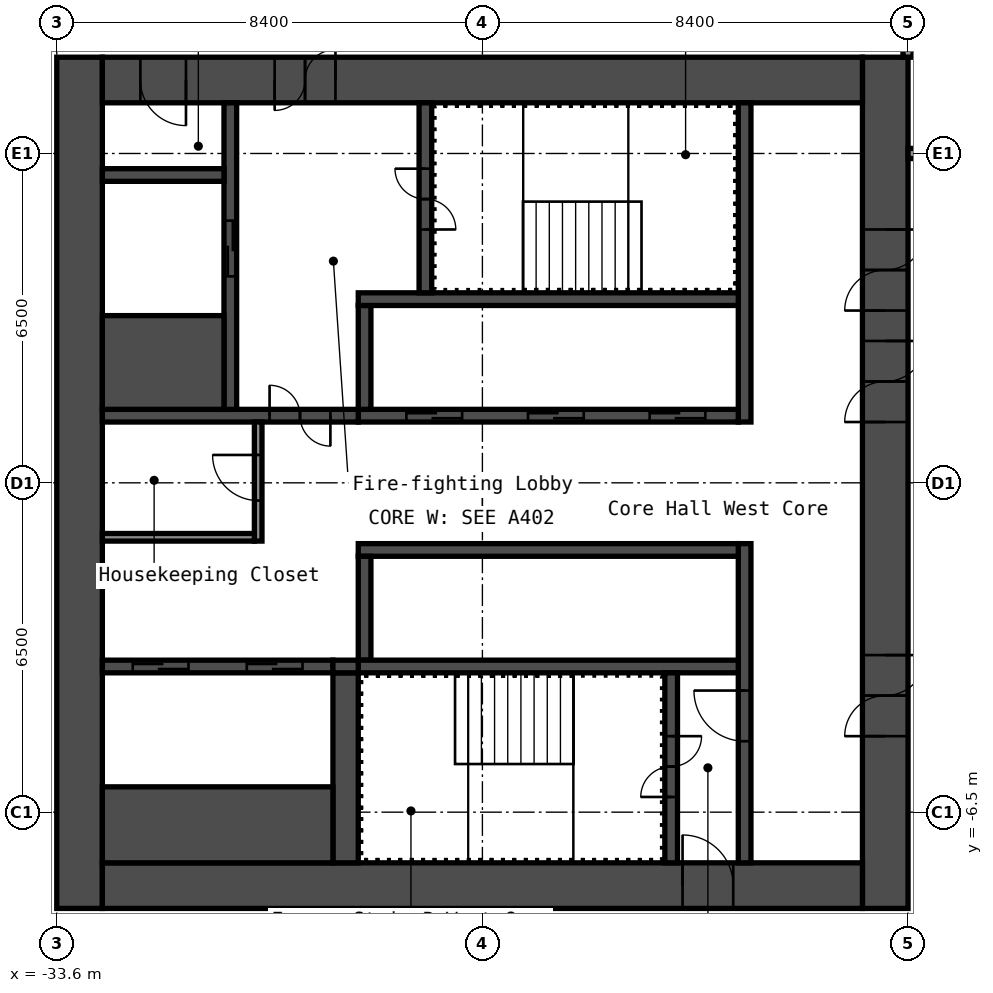
"""IFC4 building model, lengths in metres.
Left out: names, types, materials, properties, quantities, classifications, styles, units other than length and angle.
Written with IfcOpenShell. Run it as: python <this file> out.ifc"""

import sys

from ifc_helpers import new_model, si_unit, direction, frame, frame_2d, origin, place, context, subcontext, project, spatial, rectangle, extrude, element, fill, save


model = new_model("IFC4")
c1 = context("Model", 3, precision=1e-05, world=origin(), true_north=direction((0.0, 1.0)))
c2 = subcontext(c1, "Body", "Model", "MODEL_VIEW")
j1 = project(units=[si_unit("LENGTHUNIT", "METRE"), si_unit("PLANEANGLEUNIT", "RADIAN")], contexts=[c1])
p1 = place(None, origin())
s1 = spatial("IfcSite", under=j1, at=p1, CompositionType="ELEMENT")
p2 = place(p1, origin())
s2 = spatial("IfcBuilding", under=s1, at=p2, CompositionType="ELEMENT")
p3 = place(p2, frame((0.0, 0.0, 9.0)))
s3 = spatial("IfcBuildingStorey", under=s2, at=p3, CompositionType="ELEMENT", Elevation=9.0)
p4 = place(p3, frame((-17.25, -8.4, 0.0), z_axis=(0.0, 0.0, 1.0), x_axis=(0.0, 1.0, 0.0)))
e1 = element("IfcWall", 1, at=p4, inside=s3, PredefinedType="SHEAR", context=c2, shape_type="SweptSolid", body=[
    extrude(rectangle(XDim=16.8, YDim=0.9, at=frame_2d((8.4, 0.0))), origin(), (0.0, 0.0, 1.0), 5.6),
])
p5 = place(p4, frame((3.4, 0.0, 0.0)))
e2 = element("IfcOpeningElement", 2, at=p5, cuts=e1, PredefinedType="OPENING", context=c2, shape_type="SweptSolid", body=[
    extrude(rectangle(XDim=1.6, YDim=2.1, at=frame_2d((0.8, 1.05))), frame((0.0, 0.46, 0.0), z_axis=(0.0, -1.0, 0.0), x_axis=(1.0, 0.0, 0.0)), (0.0, 0.0, 1.0), 0.92),
])
p6 = place(p4, frame((9.6, 0.0, 0.0)))
e3 = element("IfcOpeningElement", 3, at=p6, cuts=e1, PredefinedType="OPENING", context=c2, shape_type="SweptSolid", body=[
    extrude(rectangle(XDim=1.6, YDim=2.1, at=frame_2d((0.8, 1.05))), frame((0.0, 0.46, 0.0), z_axis=(0.0, -1.0, 0.0), x_axis=(1.0, 0.0, 0.0)), (0.0, 0.0, 1.0), 0.92),
])
p7 = place(p4, frame((11.8, 0.0, 0.0)))
e4 = element("IfcOpeningElement", 4, at=p7, cuts=e1, PredefinedType="OPENING", context=c2, shape_type="SweptSolid", body=[
    extrude(rectangle(XDim=1.6, YDim=2.1, at=frame_2d((0.8, 1.05))), frame((0.0, 0.46, 0.0), z_axis=(0.0, -1.0, 0.0), x_axis=(1.0, 0.0, 0.0)), (0.0, 0.0, 1.0), 0.92),
])
p8 = place(p3, frame((-33.15, -8.4, 0.0), z_axis=(0.0, 0.0, 1.0), x_axis=(0.0, 1.0, 0.0)))
e5 = element("IfcWall", 5, at=p8, inside=s3, PredefinedType="SHEAR", context=c2, shape_type="SweptSolid", body=[
    extrude(rectangle(XDim=16.8, YDim=0.9, at=frame_2d((8.4, 0.0))), origin(), (0.0, 0.0, 1.0), 5.6),
])
p9 = place(p3, frame((-32.7, 7.95, 0.0), z_axis=(0.0, 0.0, 1.0), x_axis=(1.0, 0.0, 0.0)))
e6 = element("IfcWall", 6, at=p9, inside=s3, PredefinedType="SHEAR", context=c2, shape_type="SweptSolid", body=[
    extrude(rectangle(XDim=15.0, YDim=0.9, at=frame_2d((7.5, 0.0))), origin(), (0.0, 0.0, 1.0), 5.6),
])
p10 = place(p9, frame((3.4, 0.0, 0.0)))
e7 = element("IfcOpeningElement", 7, at=p10, cuts=e6, PredefinedType="OPENING", context=c2, shape_type="SweptSolid", body=[
    extrude(rectangle(XDim=1.2, YDim=2.1, at=frame_2d((0.6, 1.05))), frame((0.0, 0.46, 0.0), z_axis=(0.0, -1.0, 0.0), x_axis=(1.0, 0.0, 0.0)), (0.0, 0.0, 1.0), 0.92),
])
p11 = place(p9, frame((0.75, 0.0, 0.0)))
e8 = element("IfcOpeningElement", 8, at=p11, cuts=e6, PredefinedType="OPENING", context=c2, shape_type="SweptSolid", body=[
    extrude(rectangle(XDim=0.9, YDim=2.1, at=frame_2d((0.45, 1.05))), frame((0.0, 0.46, 0.0), z_axis=(0.0, -1.0, 0.0), x_axis=(1.0, 0.0, 0.0)), (0.0, 0.0, 1.0), 0.92),
])
p12 = place(p3, frame((-32.7, -7.95, 0.0), z_axis=(0.0, 0.0, 1.0), x_axis=(1.0, 0.0, 0.0)))
e9 = element("IfcWall", 9, at=p12, inside=s3, PredefinedType="SHEAR", context=c2, shape_type="SweptSolid", body=[
    extrude(rectangle(XDim=15.0, YDim=0.9, at=frame_2d((7.5, 0.0))), origin(), (0.0, 0.0, 1.0), 5.6),
])
p13 = place(p12, frame((11.45, 0.0, 0.0)))
e10 = element("IfcOpeningElement", 10, at=p13, cuts=e9, PredefinedType="OPENING", context=c2, shape_type="SweptSolid", body=[
    extrude(rectangle(XDim=1.0, YDim=2.1, at=frame_2d((0.5, 1.05))), frame((0.0, 0.46, 0.0), z_axis=(0.0, -1.0, 0.0), x_axis=(1.0, 0.0, 0.0)), (0.0, 0.0, 1.0), 0.92),
])
p14 = place(p3, frame((-20.025, 1.2, 0.0), z_axis=(0.0, 0.0, 1.0), x_axis=(0.0, 1.0, 0.0)))
e11 = element("IfcWall", 11, at=p14, inside=s3, PredefinedType="SHEAR", context=c2, shape_type="SweptSolid", body=[
    extrude(rectangle(XDim=6.3, YDim=0.25, at=frame_2d((3.15, 0.0))), origin(), (0.0, 0.0, 1.0), 5.6),
])
p15 = place(p3, frame((-20.025, -7.5, 0.0), z_axis=(0.0, 0.0, 1.0), x_axis=(0.0, 1.0, 0.0)))
e12 = element("IfcWall", 12, at=p15, inside=s3, PredefinedType="SHEAR", context=c2, shape_type="SweptSolid", body=[
    extrude(rectangle(XDim=6.3, YDim=0.25, at=frame_2d((3.15, 0.0))), origin(), (0.0, 0.0, 1.0), 5.6),
])
p16 = place(p15, frame((2.4, 0.0, 0.0)))
e13 = element("IfcOpeningElement", 13, at=p16, cuts=e12, PredefinedType="OPENING", context=c2, shape_type="SweptSolid", body=[
    extrude(rectangle(XDim=1.0, YDim=2.1, at=frame_2d((0.5, 1.05))), frame((0.0, 0.135, 0.0), z_axis=(0.0, -1.0, 0.0), x_axis=(1.0, 0.0, 0.0)), (0.0, 0.0, 1.0), 0.27),
])
p17 = place(p3, frame((-27.65, 1.325, 0.0), z_axis=(0.0, 0.0, 1.0), x_axis=(1.0, 0.0, 0.0)))
e14 = element("IfcWall", 14, at=p17, inside=s3, PredefinedType="SHEAR", context=c2, shape_type="SweptSolid", body=[
    extrude(rectangle(XDim=7.5, YDim=0.25, at=frame_2d((3.75, 0.0))), origin(), (0.0, 0.0, 1.0), 5.6),
])
p18 = place(p17, frame((5.75, 0.0, 0.0)))
e15 = element("IfcOpeningElement", 15, at=p18, cuts=e14, PredefinedType="OPENING", context=c2, shape_type="SweptSolid", body=[
    extrude(rectangle(XDim=1.1, YDim=2.1, at=frame_2d((0.55, 1.05))), frame((0.0, 0.135, 0.0), z_axis=(0.0, -1.0, 0.0), x_axis=(1.0, 0.0, 0.0)), (0.0, 0.0, 1.0), 0.27),
])
p19 = place(p17, frame((3.35, 0.0, 0.0)))
e16 = element("IfcOpeningElement", 16, at=p19, cuts=e14, PredefinedType="OPENING", context=c2, shape_type="SweptSolid", body=[
    extrude(rectangle(XDim=1.1, YDim=2.1, at=frame_2d((0.55, 1.05))), frame((0.0, 0.135, 0.0), z_axis=(0.0, -1.0, 0.0), x_axis=(1.0, 0.0, 0.0)), (0.0, 0.0, 1.0), 0.27),
])
p20 = place(p17, frame((0.95, 0.0, 0.0)))
e17 = element("IfcOpeningElement", 17, at=p20, cuts=e14, PredefinedType="OPENING", context=c2, shape_type="SweptSolid", body=[
    extrude(rectangle(XDim=1.1, YDim=2.1, at=frame_2d((0.55, 1.05))), frame((0.0, 0.135, 0.0), z_axis=(0.0, -1.0, 0.0), x_axis=(1.0, 0.0, 0.0)), (0.0, 0.0, 1.0), 0.27),
])
p21 = place(p3, frame((-27.525, 1.45, 0.0), z_axis=(0.0, 0.0, 1.0), x_axis=(0.0, 1.0, 0.0)))
e18 = element("IfcWall", 18, at=p21, inside=s3, PredefinedType="SHEAR", context=c2, shape_type="SweptSolid", body=[
    extrude(rectangle(XDim=2.05, YDim=0.25, at=frame_2d((1.025, 0.0))), origin(), (0.0, 0.0, 1.0), 5.6),
])
p22 = place(p3, frame((-27.65, 3.625, 0.0), z_axis=(0.0, 0.0, 1.0), x_axis=(1.0, 0.0, 0.0)))
e19 = element("IfcWall", 19, at=p22, inside=s3, PredefinedType="SHEAR", context=c2, shape_type="SweptSolid", body=[
    extrude(rectangle(XDim=7.5, YDim=0.25, at=frame_2d((3.75, 0.0))), origin(), (0.0, 0.0, 1.0), 5.6),
])
p23 = place(p3, frame((-26.325, 3.75, 0.0), z_axis=(0.0, 0.0, 1.0), x_axis=(0.0, 1.0, 0.0)))
e20 = element("IfcWall", 20, at=p23, inside=s3, PredefinedType="SHEAR", context=c2, shape_type="SweptSolid", body=[
    extrude(rectangle(XDim=3.75, YDim=0.25, at=frame_2d((1.875, 0.0))), origin(), (0.0, 0.0, 1.0), 5.6),
])
p24 = place(p23, frame((1.25, 0.0, 0.0)))
e21 = element("IfcOpeningElement", 21, at=p24, cuts=e20, PredefinedType="OPENING", context=c2, shape_type="SweptSolid", body=[
    extrude(rectangle(XDim=1.2, YDim=2.1, at=frame_2d((0.6, 1.05))), frame((0.0, 0.135, 0.0), z_axis=(0.0, -1.0, 0.0), x_axis=(1.0, 0.0, 0.0)), (0.0, 0.0, 1.0), 0.27),
])
p25 = place(p3, frame((-32.7, 1.325, 0.0), z_axis=(0.0, 0.0, 1.0), x_axis=(1.0, 0.0, 0.0)))
e22 = element("IfcWall", 22, at=p25, inside=s3, PredefinedType="SHEAR", context=c2, shape_type="SweptSolid", body=[
    extrude(rectangle(XDim=5.05, YDim=0.25, at=frame_2d((2.525, 0.0))), origin(), (0.0, 0.0, 1.0), 5.6),
])
p26 = place(p25, frame((3.3, 0.0, 0.0)))
e23 = element("IfcOpeningElement", 23, at=p26, cuts=e22, PredefinedType="OPENING", context=c2, shape_type="SweptSolid", body=[
    extrude(rectangle(XDim=1.2, YDim=2.1, at=frame_2d((0.6, 1.05))), frame((0.0, 0.135, 0.0), z_axis=(0.0, -1.0, 0.0), x_axis=(1.0, 0.0, 0.0)), (0.0, 0.0, 1.0), 0.27),
])
p27 = place(p3, frame((-30.175, 1.45, 0.0), z_axis=(0.0, 0.0, 1.0), x_axis=(0.0, 1.0, 0.0)))
e24 = element("IfcWall", 24, at=p27, inside=s3, PredefinedType="SHEAR", context=c2, shape_type="SweptSolid", body=[
    extrude(rectangle(XDim=6.05, YDim=0.25, at=frame_2d((3.025, 0.0))), origin(), (0.0, 0.0, 1.0), 5.6),
])
p28 = place(p27, frame((2.625, 0.0, 0.0)))
e25 = element("IfcOpeningElement", 25, at=p28, cuts=e24, PredefinedType="OPENING", context=c2, shape_type="SweptSolid", body=[
    extrude(rectangle(XDim=1.1, YDim=2.1, at=frame_2d((0.55, 1.05))), frame((0.0, 0.135, 0.0), z_axis=(0.0, -1.0, 0.0), x_axis=(1.0, 0.0, 0.0)), (0.0, 0.0, 1.0), 0.27),
])
p29 = place(p3, frame((-32.7, 2.375, 0.0), z_axis=(0.0, 0.0, 1.0), x_axis=(1.0, 0.0, 0.0)))
e26 = element("IfcWall", 26, at=p29, inside=s3, PredefinedType="SHEAR", context=c2, shape_type="SweptSolid", body=[
    extrude(rectangle(XDim=2.4, YDim=1.85, at=frame_2d((1.2, 0.0))), origin(), (0.0, 0.0, 1.0), 5.6),
])
p30 = place(p3, frame((-32.7, 6.075, 0.0), z_axis=(0.0, 0.0, 1.0), x_axis=(1.0, 0.0, 0.0)))
e27 = element("IfcWall", 27, at=p30, inside=s3, PredefinedType="SHEAR", context=c2, shape_type="SweptSolid", body=[
    extrude(rectangle(XDim=2.4, YDim=0.25, at=frame_2d((1.2, 0.0))), origin(), (0.0, 0.0, 1.0), 5.6),
])
p31 = place(p3, frame((-27.65, -1.325, 0.0), z_axis=(0.0, 0.0, 1.0), x_axis=(1.0, 0.0, 0.0)))
e28 = element("IfcWall", 28, at=p31, inside=s3, PredefinedType="SHEAR", context=c2, shape_type="SweptSolid", body=[
    extrude(rectangle(XDim=7.5, YDim=0.25, at=frame_2d((3.75, 0.0))), origin(), (0.0, 0.0, 1.0), 5.6),
])
p32 = place(p3, frame((-27.525, -3.5, 0.0), z_axis=(0.0, 0.0, 1.0), x_axis=(0.0, 1.0, 0.0)))
e29 = element("IfcWall", 29, at=p32, inside=s3, PredefinedType="SHEAR", context=c2, shape_type="SweptSolid", body=[
    extrude(rectangle(XDim=2.05, YDim=0.25, at=frame_2d((1.025, 0.0))), origin(), (0.0, 0.0, 1.0), 5.6),
])
p33 = place(p3, frame((-27.65, -3.625, 0.0), z_axis=(0.0, 0.0, 1.0), x_axis=(1.0, 0.0, 0.0)))
e30 = element("IfcWall", 30, at=p33, inside=s3, PredefinedType="SHEAR", context=c2, shape_type="SweptSolid", body=[
    extrude(rectangle(XDim=7.5, YDim=0.25, at=frame_2d((3.75, 0.0))), origin(), (0.0, 0.0, 1.0), 5.6),
])
p34 = place(p3, frame((-21.475, -7.5, 0.0), z_axis=(0.0, 0.0, 1.0), x_axis=(0.0, 1.0, 0.0)))
e31 = element("IfcWall", 31, at=p34, inside=s3, PredefinedType="SHEAR", context=c2, shape_type="SweptSolid", body=[
    extrude(rectangle(XDim=3.75, YDim=0.25, at=frame_2d((1.875, 0.0))), origin(), (0.0, 0.0, 1.0), 5.6),
])
p35 = place(p34, frame((1.3, 0.0, 0.0)))
e32 = element("IfcOpeningElement", 32, at=p35, cuts=e31, PredefinedType="OPENING", context=c2, shape_type="SweptSolid", body=[
    extrude(rectangle(XDim=1.2, YDim=2.1, at=frame_2d((0.6, 1.05))), frame((0.0, 0.135, 0.0), z_axis=(0.0, -1.0, 0.0), x_axis=(1.0, 0.0, 0.0)), (0.0, 0.0, 1.0), 0.27),
])
p36 = place(p3, frame((-27.9, -7.5, 0.0), z_axis=(0.0, 0.0, 1.0), x_axis=(0.0, 1.0, 0.0)))
e33 = element("IfcWall", 33, at=p36, inside=s3, PredefinedType="SHEAR", context=c2, shape_type="SweptSolid", body=[
    extrude(rectangle(XDim=3.75, YDim=0.5, at=frame_2d((1.875, 0.0))), origin(), (0.0, 0.0, 1.0), 5.6),
])
p37 = place(p3, frame((-32.7, -3.625, 0.0), z_axis=(0.0, 0.0, 1.0), x_axis=(1.0, 0.0, 0.0)))
e34 = element("IfcWall", 34, at=p37, inside=s3, PredefinedType="SHEAR", context=c2, shape_type="SweptSolid", body=[
    extrude(rectangle(XDim=4.55, YDim=0.25, at=frame_2d((2.275, 0.0))), origin(), (0.0, 0.0, 1.0), 5.6),
])
p38 = place(p37, frame((2.85, 0.0, 0.0)))
e35 = element("IfcOpeningElement", 35, at=p38, cuts=e34, PredefinedType="OPENING", context=c2, shape_type="SweptSolid", body=[
    extrude(rectangle(XDim=1.1, YDim=2.1, at=frame_2d((0.55, 1.05))), frame((0.0, 0.135, 0.0), z_axis=(0.0, -1.0, 0.0), x_axis=(1.0, 0.0, 0.0)), (0.0, 0.0, 1.0), 0.27),
])
p39 = place(p37, frame((0.6, 0.0, 0.0)))
e36 = element("IfcOpeningElement", 36, at=p39, cuts=e34, PredefinedType="OPENING", context=c2, shape_type="SweptSolid", body=[
    extrude(rectangle(XDim=1.1, YDim=2.1, at=frame_2d((0.55, 1.05))), frame((0.0, 0.135, 0.0), z_axis=(0.0, -1.0, 0.0), x_axis=(1.0, 0.0, 0.0)), (0.0, 0.0, 1.0), 0.27),
])
p40 = place(p3, frame((-32.7, -6.75, 0.0), z_axis=(0.0, 0.0, 1.0), x_axis=(1.0, 0.0, 0.0)))
e37 = element("IfcWall", 37, at=p40, inside=s3, PredefinedType="SHEAR", context=c2, shape_type="SweptSolid", body=[
    extrude(rectangle(XDim=4.55, YDim=1.5, at=frame_2d((2.275, 0.0))), origin(), (0.0, 0.0, 1.0), 5.6),
])
p41 = place(p3, frame((-28.15, -3.625, 0.0), z_axis=(0.0, 0.0, 1.0), x_axis=(1.0, 0.0, 0.0)))
e38 = element("IfcWall", 38, at=p41, inside=s3, PredefinedType="SHEAR", context=c2, shape_type="SweptSolid", body=[
    extrude(rectangle(XDim=0.5, YDim=0.25, at=frame_2d((0.25, 0.0))), origin(), (0.0, 0.0, 1.0), 5.6),
])
p42 = place(p3, frame((-29.625, -1.15, 0.0), z_axis=(0.0, 0.0, 1.0), x_axis=(0.0, 1.0, 0.0)))
e39 = element("IfcWall", 39, at=p42, inside=s3, PredefinedType="PARTITIONING", context=c2, shape_type="SweptSolid", body=[
    extrude(rectangle(XDim=2.35, YDim=0.15, at=frame_2d((1.175, 0.0))), origin(), (0.0, 0.0, 1.0), 5.6),
])
p43 = place(p42, frame((0.8, 0.0, 0.0)))
e40 = element("IfcOpeningElement", 40, at=p43, cuts=e39, PredefinedType="OPENING", context=c2, shape_type="SweptSolid", body=[
    extrude(rectangle(XDim=0.9, YDim=2.1, at=frame_2d((0.45, 1.05))), frame((0.0, 0.085, 0.0), z_axis=(0.0, -1.0, 0.0), x_axis=(1.0, 0.0, 0.0)), (0.0, 0.0, 1.0), 0.17),
])
p44 = place(p3, frame((-32.7, -1.075, 0.0), z_axis=(0.0, 0.0, 1.0), x_axis=(1.0, 0.0, 0.0)))
e41 = element("IfcWall", 41, at=p44, inside=s3, PredefinedType="PARTITIONING", context=c2, shape_type="SweptSolid", body=[
    extrude(rectangle(XDim=3.0, YDim=0.15, at=frame_2d((1.5, 0.0))), origin(), (0.0, 0.0, 1.0), 5.6),
])
p45 = place(p3, frame((-16.8, 6.5, 0.0), z_axis=(0.0, 0.0, 1.0), x_axis=(1.0, 0.0, 0.0)))
e42 = element("IfcWall", 42, at=p45, inside=s3, PredefinedType="PARTITIONING", context=c2, shape_type="SweptSolid", body=[
    extrude(rectangle(XDim=4.8, YDim=0.2, at=frame_2d((2.4, 0.0))), origin(), (0.0, 0.0, 1.0), 5.6),
])
p46 = place(p3, frame((-16.8, 10.4, 0.0), z_axis=(0.0, 0.0, 1.0), x_axis=(0.0, -1.0, 0.0)))
e43 = element("IfcWall", 43, at=p46, inside=s3, PredefinedType="PARTITIONING", context=c2, shape_type="SweptSolid", body=[
    extrude(rectangle(XDim=2.0, YDim=0.2, at=frame_2d((1.0, 0.0))), origin(), (0.0, 0.0, 1.0), 5.6),
])
p47 = place(p46, frame((0.3, 0.0, 0.0)))
e44 = element("IfcOpeningElement", 44, at=p47, cuts=e43, PredefinedType="OPENING", context=c2, shape_type="SweptSolid", body=[
    extrude(rectangle(XDim=1.4, YDim=2.1, at=frame_2d((0.7, 1.05))), frame((0.0, 0.11, 0.0), z_axis=(0.0, -1.0, 0.0), x_axis=(1.0, 0.0, 0.0)), (0.0, 0.0, 1.0), 0.22),
])
p48 = place(p5, origin())
e45 = element("IfcDoor", 45, at=p48, inside=s3, OperationType="DOUBLE_DOOR_SINGLE_SWING", PredefinedType="DOOR", context=c2, shape_type="SweptSolid", body=[
    extrude(rectangle(XDim=1.6, YDim=2.1, at=frame_2d((0.8, 1.05))), frame((0.0, 0.025, 0.0), z_axis=(0.0, -1.0, 0.0), x_axis=(1.0, 0.0, 0.0)), (0.0, 0.0, 1.0), 0.05),
])
fill(e2, e45)
p49 = place(p6, origin())
e46 = element("IfcDoor", 46, at=p49, inside=s3, OperationType="DOUBLE_DOOR_SINGLE_SWING", PredefinedType="DOOR", context=c2, shape_type="SweptSolid", body=[
    extrude(rectangle(XDim=1.6, YDim=2.1, at=frame_2d((0.8, 1.05))), frame((0.0, 0.025, 0.0), z_axis=(0.0, -1.0, 0.0), x_axis=(1.0, 0.0, 0.0)), (0.0, 0.0, 1.0), 0.05),
])
fill(e3, e46)
p50 = place(p7, origin())
e47 = element("IfcDoor", 47, at=p50, inside=s3, OperationType="DOUBLE_DOOR_SINGLE_SWING", PredefinedType="DOOR", context=c2, shape_type="SweptSolid", body=[
    extrude(rectangle(XDim=1.6, YDim=2.1, at=frame_2d((0.8, 1.05))), frame((0.0, 0.025, 0.0), z_axis=(0.0, -1.0, 0.0), x_axis=(1.0, 0.0, 0.0)), (0.0, 0.0, 1.0), 0.05),
])
fill(e4, e47)
p51 = place(p10, origin())
e48 = element("IfcDoor", 48, at=p51, inside=s3, OperationType="DOUBLE_DOOR_SINGLE_SWING", PredefinedType="DOOR", context=c2, shape_type="SweptSolid", body=[
    extrude(rectangle(XDim=1.2, YDim=2.1, at=frame_2d((0.6, 1.05))), frame((0.0, 0.025, 0.0), z_axis=(0.0, -1.0, 0.0), x_axis=(1.0, 0.0, 0.0)), (0.0, 0.0, 1.0), 0.05),
])
fill(e7, e48)
p52 = place(p11, origin())
e49 = element("IfcDoor", 49, at=p52, inside=s3, OperationType="SINGLE_SWING_RIGHT", PredefinedType="DOOR", context=c2, shape_type="SweptSolid", body=[
    extrude(rectangle(XDim=0.9, YDim=2.1, at=frame_2d((0.45, 1.05))), frame((0.0, 0.025, 0.0), z_axis=(0.0, -1.0, 0.0), x_axis=(1.0, 0.0, 0.0)), (0.0, 0.0, 1.0), 0.05),
])
fill(e8, e49)
p53 = place(p13, origin())
e50 = element("IfcDoor", 50, at=p53, inside=s3, OperationType="SINGLE_SWING_RIGHT", PredefinedType="DOOR", context=c2, shape_type="SweptSolid", body=[
    extrude(rectangle(XDim=1.0, YDim=2.1, at=frame_2d((0.5, 1.05))), frame((0.0, 0.025, 0.0), z_axis=(0.0, -1.0, 0.0), x_axis=(1.0, 0.0, 0.0)), (0.0, 0.0, 1.0), 0.05),
])
fill(e10, e50)
p54 = place(p24, origin())
e51 = element("IfcDoor", 51, at=p54, inside=s3, OperationType="DOUBLE_DOOR_SINGLE_SWING", PredefinedType="DOOR", context=c2, shape_type="SweptSolid", body=[
    extrude(rectangle(XDim=1.2, YDim=2.1, at=frame_2d((0.6, 1.05))), frame((0.0, 0.025, 0.0), z_axis=(0.0, -1.0, 0.0), x_axis=(1.0, 0.0, 0.0)), (0.0, 0.0, 1.0), 0.05),
])
fill(e21, e51)
p55 = place(p35, origin())
e52 = element("IfcDoor", 52, at=p55, inside=s3, OperationType="DOUBLE_DOOR_SINGLE_SWING", PredefinedType="DOOR", context=c2, shape_type="SweptSolid", body=[
    extrude(rectangle(XDim=1.2, YDim=2.1, at=frame_2d((0.6, 1.05))), frame((0.0, 0.025, 0.0), z_axis=(0.0, -1.0, 0.0), x_axis=(1.0, 0.0, 0.0)), (0.0, 0.0, 1.0), 0.05),
])
fill(e32, e52)
p56 = place(p16, origin())
e53 = element("IfcDoor", 53, at=p56, inside=s3, OperationType="SINGLE_SWING_LEFT", PredefinedType="DOOR", context=c2, shape_type="SweptSolid", body=[
    extrude(rectangle(XDim=1.0, YDim=2.1, at=frame_2d((0.5, 1.05))), frame((0.0, 0.025, 0.0), z_axis=(0.0, -1.0, 0.0), x_axis=(1.0, 0.0, 0.0)), (0.0, 0.0, 1.0), 0.05),
])
fill(e13, e53)
p57 = place(p26, origin())
e54 = element("IfcDoor", 54, at=p57, inside=s3, OperationType="DOUBLE_DOOR_SINGLE_SWING", PredefinedType="DOOR", context=c2, shape_type="SweptSolid", body=[
    extrude(rectangle(XDim=1.2, YDim=2.1, at=frame_2d((0.6, 1.05))), frame((0.0, 0.025, 0.0), z_axis=(0.0, -1.0, 0.0), x_axis=(1.0, 0.0, 0.0)), (0.0, 0.0, 1.0), 0.05),
])
fill(e23, e54)
p58 = place(p43, origin())
e55 = element("IfcDoor", 55, at=p58, inside=s3, OperationType="SINGLE_SWING_LEFT", PredefinedType="DOOR", context=c2, shape_type="SweptSolid", body=[
    extrude(rectangle(XDim=0.9, YDim=2.1, at=frame_2d((0.45, 1.05))), frame((0.0, 0.025, 0.0), z_axis=(0.0, -1.0, 0.0), x_axis=(1.0, 0.0, 0.0)), (0.0, 0.0, 1.0), 0.05),
])
fill(e40, e55)
p59 = place(p18, origin())
e56 = element("IfcDoor", 56, at=p59, inside=s3, OperationType="DOUBLE_DOOR_SLIDING", PredefinedType="DOOR", context=c2, shape_type="SweptSolid", body=[
    extrude(rectangle(XDim=1.1, YDim=2.1, at=frame_2d((0.55, 1.05))), frame((0.0, 0.025, 0.0), z_axis=(0.0, -1.0, 0.0), x_axis=(1.0, 0.0, 0.0)), (0.0, 0.0, 1.0), 0.05),
])
fill(e15, e56)
p60 = place(p19, origin())
e57 = element("IfcDoor", 57, at=p60, inside=s3, OperationType="DOUBLE_DOOR_SLIDING", PredefinedType="DOOR", context=c2, shape_type="SweptSolid", body=[
    extrude(rectangle(XDim=1.1, YDim=2.1, at=frame_2d((0.55, 1.05))), frame((0.0, 0.025, 0.0), z_axis=(0.0, -1.0, 0.0), x_axis=(1.0, 0.0, 0.0)), (0.0, 0.0, 1.0), 0.05),
])
fill(e16, e57)
p61 = place(p20, origin())
e58 = element("IfcDoor", 58, at=p61, inside=s3, OperationType="DOUBLE_DOOR_SLIDING", PredefinedType="DOOR", context=c2, shape_type="SweptSolid", body=[
    extrude(rectangle(XDim=1.1, YDim=2.1, at=frame_2d((0.55, 1.05))), frame((0.0, 0.025, 0.0), z_axis=(0.0, -1.0, 0.0), x_axis=(1.0, 0.0, 0.0)), (0.0, 0.0, 1.0), 0.05),
])
fill(e17, e58)
p62 = place(p28, origin())
e59 = element("IfcDoor", 59, at=p62, inside=s3, OperationType="DOUBLE_DOOR_SLIDING", PredefinedType="DOOR", context=c2, shape_type="SweptSolid", body=[
    extrude(rectangle(XDim=1.1, YDim=2.1, at=frame_2d((0.55, 1.05))), frame((0.0, 0.025, 0.0), z_axis=(0.0, -1.0, 0.0), x_axis=(1.0, 0.0, 0.0)), (0.0, 0.0, 1.0), 0.05),
])
fill(e25, e59)
p63 = place(p38, origin())
e60 = element("IfcDoor", 60, at=p63, inside=s3, OperationType="DOUBLE_DOOR_SLIDING", PredefinedType="DOOR", context=c2, shape_type="SweptSolid", body=[
    extrude(rectangle(XDim=1.1, YDim=2.1, at=frame_2d((0.55, 1.05))), frame((0.0, 0.025, 0.0), z_axis=(0.0, -1.0, 0.0), x_axis=(1.0, 0.0, 0.0)), (0.0, 0.0, 1.0), 0.05),
])
fill(e35, e60)
p64 = place(p39, origin())
e61 = element("IfcDoor", 61, at=p64, inside=s3, OperationType="DOUBLE_DOOR_SLIDING", PredefinedType="DOOR", context=c2, shape_type="SweptSolid", body=[
    extrude(rectangle(XDim=1.1, YDim=2.1, at=frame_2d((0.55, 1.05))), frame((0.0, 0.025, 0.0), z_axis=(0.0, -1.0, 0.0), x_axis=(1.0, 0.0, 0.0)), (0.0, 0.0, 1.0), 0.05),
])
fill(e36, e61)
save(model, sys.argv[1])
